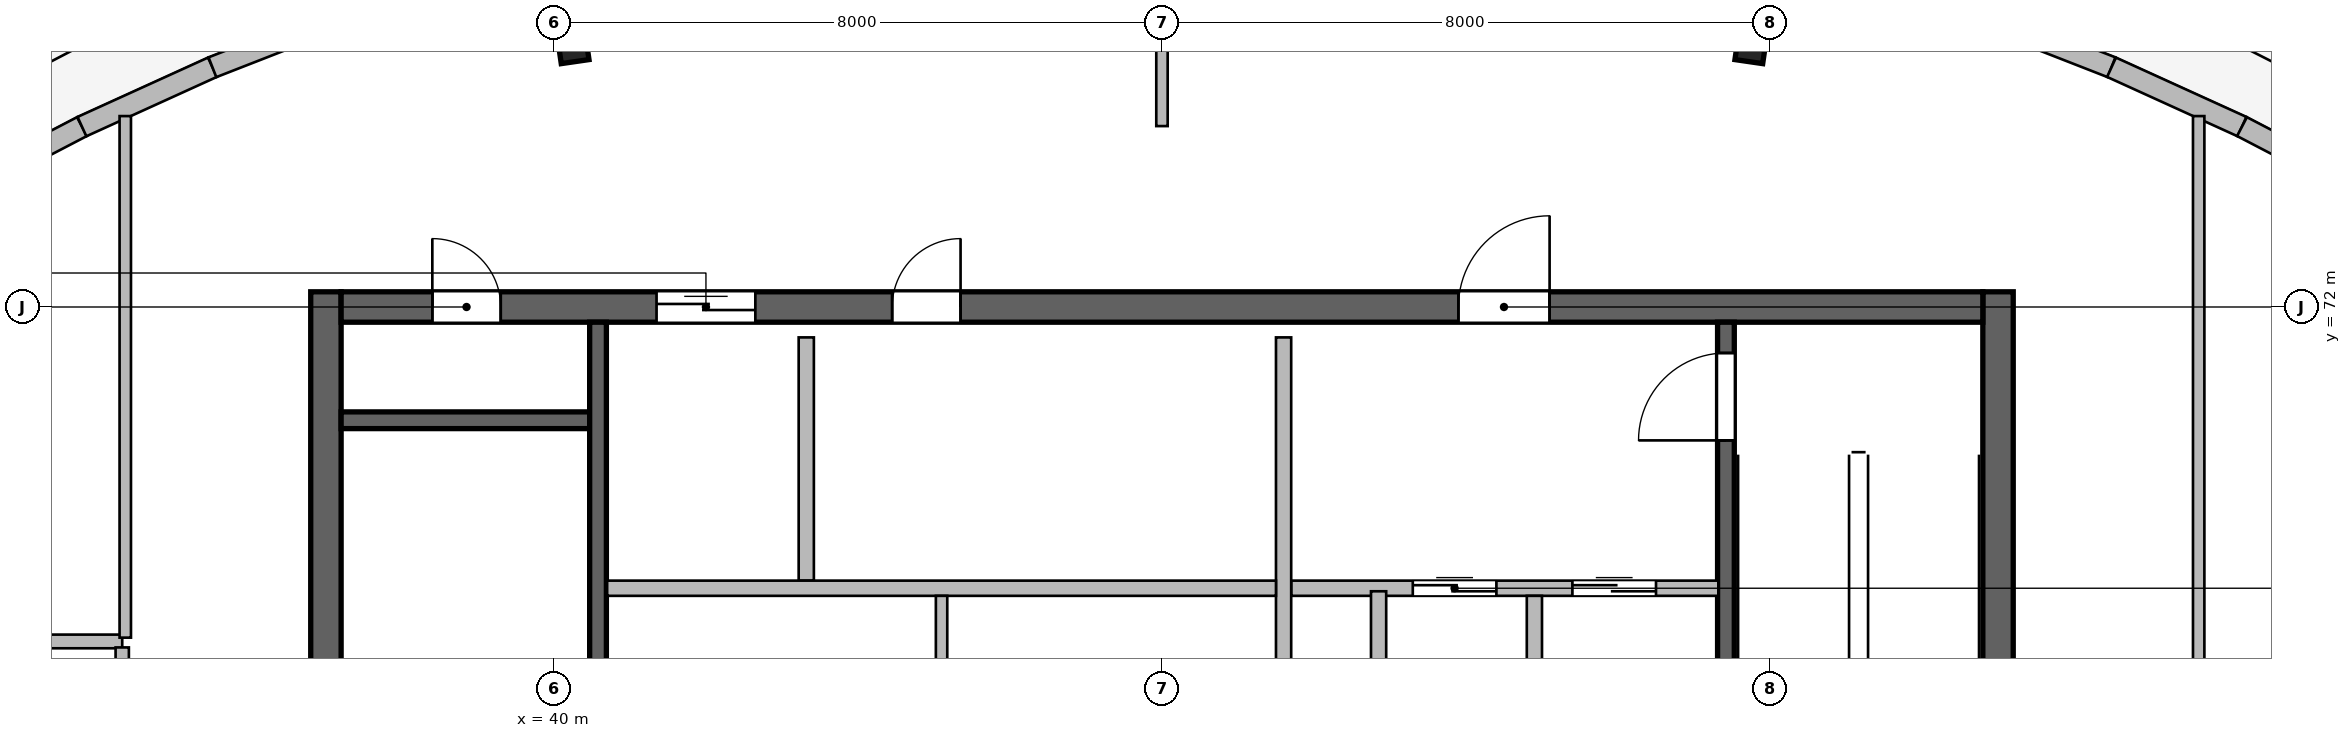
"""IFC4 building model, lengths in metres.
Left out: names, types, materials, properties, quantities, classifications, styles, units other than length and angle.
Written with IfcOpenShell. Run it as: python <this file> out.ifc"""

import sys

from ifc_helpers import new_model, si_unit, direction, frame, frame_2d, origin, origin_2d, place, context, subcontext, project, spatial, rectangle, i_section, extrude, source, transform, mapped, element, fill, save


model = new_model("IFC4")
c1 = context("Model", 3, precision=1e-05, world=origin(), true_north=direction((0.0, 1.0)))
c2 = subcontext(c1, "Body", "Model", "MODEL_VIEW")
j1 = project(units=[si_unit("LENGTHUNIT", "METRE"), si_unit("PLANEANGLEUNIT", "RADIAN")], contexts=[c1])
p1 = place(None, origin())
s1 = spatial("IfcSite", under=j1, at=p1, CompositionType="ELEMENT")
p2 = place(p1, origin())
s2 = spatial("IfcBuilding", under=s1, at=p2, CompositionType="ELEMENT")
p3 = place(p2, frame((0.0, 0.0, 312.6)))
s3 = spatial("IfcBuildingStorey", under=s2, at=p3, CompositionType="ELEMENT", Elevation=312.6)
m1 = source(origin(), c2, "Body", "SweptSolid", [
    extrude(rectangle(XDim=12.0, YDim=0.4, at=frame_2d((6.0, 0.0))), origin(), (0.0, 0.0, 1.0), 5.4),
])
for number, where, z_axis, x_axis in (
    (1, (37.0, 60.2, 0.0), (0.0, 0.0, 1.0), (0.0, 1.0, 0.0)),
    (2, (59.0, 60.2, 0.0), (0.0, 0.0, 1.0), (0.0, 1.0, 0.0)),
):
    element("IfcWall", number, at=place(p3, frame(where, z_axis=z_axis, x_axis=x_axis)), inside=s3, PredefinedType="SHEAR", context=c2, shape_type="MappedRepresentation", body=[
        mapped(m1, transform((0.0, 0.0, 0.0), scale=1.0)),
    ])
m2 = source(origin(), c2, "Body", "SweptSolid", [
    extrude(rectangle(XDim=21.6, YDim=0.4, at=frame_2d((10.8, 0.0))), origin(), (0.0, 0.0, 1.0), 5.4),
])
p4 = place(p3, frame((37.2, 72.0, 0.0), z_axis=(0.0, 0.0, 1.0), x_axis=(1.0, 0.0, 0.0)))
e3 = element("IfcWall", 3, at=p4, inside=s3, PredefinedType="SHEAR", context=c2, shape_type="MappedRepresentation", body=[
    mapped(m2, transform((0.0, 0.0, 0.0), scale=1.0)),
])
p5 = place(p4, frame((1.2, 0.0, 0.0)))
e4 = element("IfcOpeningElement", 4, at=p5, cuts=e3, PredefinedType="OPENING", context=c2, shape_type="SweptSolid", body=[
    extrude(rectangle(XDim=0.9, YDim=2.1, at=frame_2d((0.45, 1.05))), frame((0.0, 0.21, 0.0), z_axis=(0.0, -1.0, 0.0), x_axis=(1.0, 0.0, 0.0)), (0.0, 0.0, 1.0), 0.42),
])
p6 = place(p4, frame((14.7, 0.0, 0.0)))
e5 = element("IfcOpeningElement", 5, at=p6, cuts=e3, PredefinedType="OPENING", context=c2, shape_type="SweptSolid", body=[
    extrude(rectangle(XDim=1.2, YDim=2.15, at=frame_2d((0.6, 1.075))), frame((0.0, 0.21, 0.0), z_axis=(0.0, -1.0, 0.0), x_axis=(1.0, 0.0, 0.0)), (0.0, 0.0, 1.0), 0.42),
])
p7 = place(p4, frame((4.15, 0.0, 0.0)))
e6 = element("IfcOpeningElement", 6, at=p7, cuts=e3, PredefinedType="OPENING", context=c2, shape_type="SweptSolid", body=[
    extrude(rectangle(XDim=1.3, YDim=2.15, at=frame_2d((0.65, 1.075))), frame((0.0, 0.21, 0.0), z_axis=(0.0, -1.0, 0.0), x_axis=(1.0, 0.0, 0.0)), (0.0, 0.0, 1.0), 0.42),
])
p8 = place(p4, frame((7.25, 0.0, 0.0)))
e7 = element("IfcOpeningElement", 7, at=p8, cuts=e3, PredefinedType="OPENING", context=c2, shape_type="SweptSolid", body=[
    extrude(rectangle(XDim=0.9, YDim=2.1, at=frame_2d((0.45, 1.05))), frame((0.0, 0.21, 0.0), z_axis=(0.0, -1.0, 0.0), x_axis=(1.0, 0.0, 0.0)), (0.0, 0.0, 1.0), 0.42),
])
m3 = source(origin(), c2, "Body", "SweptSolid", [
    extrude(rectangle(XDim=3.27, YDim=0.22, at=frame_2d((1.635, 0.0))), origin(), (0.0, 0.0, 1.0), 5.4),
])
p9 = place(p3, frame((37.2, 70.51, 0.0), z_axis=(0.0, 0.0, 1.0), x_axis=(1.0, 0.0, 0.0)))
e8 = element("IfcWall", 8, at=p9, inside=s3, PredefinedType="SHEAR", context=c2, shape_type="MappedRepresentation", body=[
    mapped(m3, transform((0.0, 0.0, 0.0), scale=1.0)),
])
m4 = source(origin(), c2, "Body", "SweptSolid", [
    extrude(rectangle(XDim=11.2, YDim=0.22, at=frame_2d((5.6, 0.0))), origin(), (0.0, 0.0, 1.0), 5.4),
])
p10 = place(p3, frame((40.58, 60.6, 0.0), z_axis=(0.0, 0.0, 1.0), x_axis=(0.0, 1.0, 0.0)))
e9 = element("IfcWall", 9, at=p10, inside=s3, PredefinedType="SHEAR", context=c2, shape_type="MappedRepresentation", body=[
    mapped(m4, transform((0.0, 0.0, 0.0), scale=1.0)),
])
p11 = place(p3, frame((55.42, 60.6, 0.0), z_axis=(0.0, 0.0, 1.0), x_axis=(0.0, 1.0, 0.0)))
e10 = element("IfcWall", 10, at=p11, inside=s3, PredefinedType="SHEAR", context=c2, shape_type="MappedRepresentation", body=[
    mapped(m4, transform((0.0, 0.0, 0.0), scale=1.0)),
])
p12 = place(p11, frame((9.645, 0.0, 0.0)))
e11 = element("IfcOpeningElement", 11, at=p12, cuts=e10, PredefinedType="OPENING", context=c2, shape_type="SweptSolid", body=[
    extrude(rectangle(XDim=1.15, YDim=2.15, at=frame_2d((0.575, 1.075))), frame((0.0, 0.12, 0.0), z_axis=(0.0, -1.0, 0.0), x_axis=(1.0, 0.0, 0.0)), (0.0, 0.0, 1.0), 0.24),
])
m5 = source(origin(), c2, "Body", "SweptSolid", [
    extrude(i_section(OverallWidth=0.369, OverallDepth=0.356, WebThickness=0.011, FlangeThickness=0.018, at=origin_2d()), origin(), (0.0, 0.0, 1.0), 5.4),
])
for number, where, z_axis, x_axis in (
    (12, (40.253, 75.404, 0.0), (0.0, 0.0, 1.0), (-0.143, 0.99, 0.0)),
    (13, (55.747, 75.404, 0.0), (0.0, 0.0, 1.0), (0.143, 0.99, 0.0)),
):
    element("IfcColumn", number, at=place(p3, frame(where, z_axis=z_axis, x_axis=x_axis)), inside=s3, PredefinedType="COLUMN", context=c2, shape_type="MappedRepresentation", body=[
        mapped(m5, transform((0.0, 0.0, 0.0), scale=1.0)),
    ])
m6 = source(origin(), c2, "Body", "SweptSolid", [
    extrude(rectangle(XDim=1.906, YDim=0.28, at=frame_2d((0.953, 0.0))), origin(), (0.0, 0.0, 1.0), 5.12),
])
p13 = place(p3, frame((32.1, 73.493, 0.0), z_axis=(0.0, 0.0, 1.0), x_axis=(0.886820023543, 0.462114970373, 0.0)))
e14 = element("IfcWall", 14, at=p13, inside=s3, PredefinedType="SOLIDWALL", context=c2, shape_type="MappedRepresentation", body=[
    mapped(m6, transform((0.0, 0.0, 0.0), scale=1.0)),
])
m7 = source(origin(), c2, "Body", "SweptSolid", [
    extrude(rectangle(XDim=1.886, YDim=0.28, at=frame_2d((0.943, 0.0))), origin(), (0.0, 0.0, 1.0), 5.12),
])
p14 = place(p3, frame((33.79, 74.373, 0.0), z_axis=(0.0, 0.0, 1.0), x_axis=(0.910215678877, 0.414134540852, 0.0)))
e15 = element("IfcWall", 15, at=p14, inside=s3, PredefinedType="SOLIDWALL", context=c2, shape_type="MappedRepresentation", body=[
    mapped(m7, transform((0.0, 0.0, 0.0), scale=1.0)),
])
m8 = source(origin(), c2, "Body", "SweptSolid", [
    extrude(rectangle(XDim=1.869, YDim=0.28, at=frame_2d((0.934, 0.0))), origin(), (0.0, 0.0, 1.0), 5.12),
])
for number, where, z_axis, x_axis in (
    (16, (35.507, 75.154, 0.0), (0.0, 0.0, 1.0), (0.932, 0.364, 0.0)),
    (17, (58.753, 75.834, 0.0), (0.0, 0.0, 1.0), (0.932, -0.364, 0.0)),
):
    element("IfcWall", number, at=place(p3, frame(where, z_axis=z_axis, x_axis=x_axis)), inside=s3, PredefinedType="SOLIDWALL", context=c2, shape_type="MappedRepresentation", body=[
        mapped(m8, transform((0.0, 0.0, 0.0), scale=1.0)),
    ])
p15 = place(p3, frame((60.493, 75.154, 0.0), z_axis=(0.0, 0.0, 1.0), x_axis=(0.910215678877, -0.414134540852, 0.0)))
e18 = element("IfcWall", 18, at=p15, inside=s3, PredefinedType="SOLIDWALL", context=c2, shape_type="MappedRepresentation", body=[
    mapped(m7, transform((0.0, 0.0, 0.0), scale=1.0)),
])
p16 = place(p3, frame((62.21, 74.373, 0.0), z_axis=(0.0, 0.0, 1.0), x_axis=(0.886820023543, -0.462114970373, 0.0)))
e19 = element("IfcWall", 19, at=p16, inside=s3, PredefinedType="SOLIDWALL", context=c2, shape_type="MappedRepresentation", body=[
    mapped(m6, transform((0.0, 0.0, 0.0), scale=1.0)),
])
m9 = source(origin(), c2, "Body", "SweptSolid", [
    extrude(rectangle(XDim=5.62, YDim=0.2, at=frame_2d((2.81, 0.0))), origin(), (0.0, 0.0, 1.0), 5.12),
])
p17 = place(p3, frame((49.7, 68.3, 0.0), z_axis=(0.0, 0.0, 1.0), x_axis=(1.0, 0.0, 0.0)))
e20 = element("IfcWall", 20, at=p17, inside=s3, PredefinedType="SOLIDWALL", context=c2, shape_type="MappedRepresentation", body=[
    mapped(m9, transform((0.0, 0.0, 0.0), scale=1.0)),
])
p18 = place(p17, frame((1.6, 0.0, 0.0)))
e21 = element("IfcOpeningElement", 21, at=p18, cuts=e20, PredefinedType="OPENING", context=c2, shape_type="SweptSolid", body=[
    extrude(rectangle(XDim=1.1, YDim=2.15, at=frame_2d((0.55, 1.075))), frame((0.0, 0.11, 0.0), z_axis=(0.0, -1.0, 0.0), x_axis=(1.0, 0.0, 0.0)), (0.0, 0.0, 1.0), 0.22),
])
p19 = place(p17, frame((3.7, 0.0, 0.0)))
e22 = element("IfcOpeningElement", 22, at=p19, cuts=e20, PredefinedType="OPENING", context=c2, shape_type="SweptSolid", body=[
    extrude(rectangle(XDim=1.1, YDim=2.15, at=frame_2d((0.55, 1.075))), frame((0.0, 0.11, 0.0), z_axis=(0.0, -1.0, 0.0), x_axis=(1.0, 0.0, 0.0)), (0.0, 0.0, 1.0), 0.22),
])
m10 = source(origin(), c2, "Body", "SweptSolid", [
    extrude(rectangle(XDim=5.8, YDim=0.2, at=frame_2d((2.9, 0.0))), origin(), (0.0, 0.0, 1.0), 5.12),
])
p20 = place(p3, frame((49.6, 65.8, 0.0), z_axis=(0.0, 0.0, 1.0), x_axis=(0.0, 1.0, 0.0)))
e23 = element("IfcWall", 23, at=p20, inside=s3, PredefinedType="SOLIDWALL", context=c2, shape_type="MappedRepresentation", body=[
    mapped(m10, transform((0.0, 0.0, 0.0), scale=1.0)),
])
m11 = source(origin(), c2, "Body", "SweptSolid", [
    extrude(rectangle(XDim=2.58, YDim=0.2, at=frame_2d((1.29, 0.0))), origin(), (0.0, 0.0, 1.0), 5.12),
])
p21 = place(p3, frame((50.85, 65.68, 0.0), z_axis=(0.0, 0.0, 1.0), x_axis=(0.0, 1.0, 0.0)))
e24 = element("IfcWall", 24, at=p21, inside=s3, PredefinedType="SOLIDWALL", context=c2, shape_type="MappedRepresentation", body=[
    mapped(m11, transform((0.0, 0.0, 0.0), scale=1.0)),
])
m12 = source(origin(), c2, "Body", "SweptSolid", [
    extrude(rectangle(XDim=2.4, YDim=0.2, at=frame_2d((1.2, 0.0))), origin(), (0.0, 0.0, 1.0), 5.12),
])
p22 = place(p3, frame((52.9, 65.8, 0.0), z_axis=(0.0, 0.0, 1.0), x_axis=(0.0, 1.0, 0.0)))
e25 = element("IfcWall", 25, at=p22, inside=s3, PredefinedType="SOLIDWALL", context=c2, shape_type="MappedRepresentation", body=[
    mapped(m12, transform((0.0, 0.0, 0.0), scale=1.0)),
])
m13 = source(origin(), c2, "Body", "SweptSolid", [
    extrude(rectangle(XDim=3.2, YDim=0.2, at=frame_2d((1.6, 0.0))), origin(), (0.0, 0.0, 1.0), 5.12),
])
p23 = place(p3, frame((43.32, 68.4, 0.0), z_axis=(0.0, 0.0, 1.0), x_axis=(0.0, 1.0, 0.0)))
e26 = element("IfcWall", 26, at=p23, inside=s3, PredefinedType="SOLIDWALL", context=c2, shape_type="MappedRepresentation", body=[
    mapped(m13, transform((0.0, 0.0, 0.0), scale=1.0)),
])
m14 = source(origin(), c2, "Body", "SweptSolid", [
    extrude(rectangle(XDim=8.8, YDim=0.2, at=frame_2d((4.4, 0.0))), origin(), (0.0, 0.0, 1.0), 5.12),
])
p24 = place(p3, frame((40.7, 68.3, 0.0), z_axis=(0.0, 0.0, 1.0), x_axis=(1.0, 0.0, 0.0)))
e27 = element("IfcWall", 27, at=p24, inside=s3, PredefinedType="SOLIDWALL", context=c2, shape_type="MappedRepresentation", body=[
    mapped(m14, transform((0.0, 0.0, 0.0), scale=1.0)),
])
m15 = source(origin(), c2, "Body", "SweptSolid", [
    extrude(rectangle(XDim=2.4, YDim=0.15, at=frame_2d((1.2, 0.0))), origin(), (0.0, 0.0, 1.0), 5.12),
])
p25 = place(p3, frame((45.1, 65.8, 0.0), z_axis=(0.0, 0.0, 1.0), x_axis=(0.0, 1.0, 0.0)))
e28 = element("IfcWall", 28, at=p25, inside=s3, PredefinedType="PARTITIONING", context=c2, shape_type="MappedRepresentation", body=[
    mapped(m15, transform((0.0, 0.0, 0.0), scale=1.0)),
])
m16 = source(origin(), c2, "Body", "SweptSolid", [
    extrude(rectangle(XDim=3.52, YDim=0.18, at=frame_2d((1.76, 0.0))), origin(), (0.0, 0.0, 1.0), 5.12),
])
p26 = place(p3, frame((30.8, 67.6, 0.0), z_axis=(0.0, 0.0, 1.0), x_axis=(1.0, 0.0, 0.0)))
e29 = element("IfcWall", 29, at=p26, inside=s3, PredefinedType="PLUMBINGWALL", context=c2, shape_type="MappedRepresentation", body=[
    mapped(m16, transform((0.0, 0.0, 0.0), scale=1.0)),
])
m17 = source(origin(), c2, "Body", "SweptSolid", [
    extrude(rectangle(XDim=2.002, YDim=0.175, at=frame_2d((1.001, 0.0))), origin(), (0.0, 0.0, 1.0), 5.12),
])
p27 = place(p3, frame((34.32, 65.519, 0.0), z_axis=(0.0, 0.0, 1.0), x_axis=(0.0, 1.0, 0.0)))
e30 = element("IfcWall", 30, at=p27, inside=s3, PredefinedType="PARTITIONING", context=c2, shape_type="MappedRepresentation", body=[
    mapped(m17, transform((0.0, 0.0, 0.0), scale=1.0)),
])
p28 = place(p27, frame((0.526, 0.0, 0.0)))
e31 = element("IfcOpeningElement", 31, at=p28, cuts=e30, PredefinedType="OPENING", context=c2, shape_type="SweptSolid", body=[
    extrude(rectangle(XDim=0.95, YDim=2.12, at=frame_2d((0.475, 1.06))), frame((0.0, 0.098, 0.0), z_axis=(0.0, -1.0, 0.0), x_axis=(1.0, 0.0, 0.0)), (0.0, 0.0, 1.0), 0.195),
])
m18 = source(origin(), c2, "Body", "SweptSolid", [
    extrude(rectangle(XDim=3.241, YDim=0.15, at=frame_2d((1.621, 0.0))), origin(), (0.0, 0.0, 1.0), 4.794),
])
p29 = place(p3, frame((48.0, 74.38, 0.0), z_axis=(0.0, 0.0, 1.0), x_axis=(0.0, 1.0, 0.0)))
e32 = element("IfcWall", 32, at=p29, inside=s3, PredefinedType="PARTITIONING", context=c2, shape_type="MappedRepresentation", body=[
    mapped(m18, transform((0.0, 0.0, 0.0), scale=1.0)),
])
m19 = source(origin(), c2, "Body", "SweptSolid", [
    extrude(rectangle(XDim=6.862, YDim=0.15, at=frame_2d((3.431, 0.0))), origin(), (0.0, 0.0, 1.0), 5.12),
])
p30 = place(p3, frame((34.36, 67.65, 0.0), z_axis=(0.0, 0.0, 1.0), x_axis=(0.0, 1.0, 0.0)))
e33 = element("IfcWall", 33, at=p30, inside=s3, PredefinedType="PARTITIONING", context=c2, shape_type="MappedRepresentation", body=[
    mapped(m19, transform((0.0, 0.0, 0.0), scale=1.0)),
])
m20 = source(origin(), c2, "Body", "SweptSolid", [
    extrude(rectangle(XDim=8.962, YDim=0.15, at=frame_2d((4.481, 0.0))), origin(), (0.0, 0.0, 1.0), 5.12),
])
p31 = place(p3, frame((61.64, 65.55, 0.0), z_axis=(0.0, 0.0, 1.0), x_axis=(0.0, 1.0, 0.0)))
e34 = element("IfcWall", 34, at=p31, inside=s3, PredefinedType="PARTITIONING", context=c2, shape_type="MappedRepresentation", body=[
    mapped(m20, transform((0.0, 0.0, 0.0), scale=1.0)),
])
m21 = source(origin(), c2, "Body", "SweptSolid", [
    extrude(rectangle(XDim=0.9, YDim=2.1, at=frame_2d((0.45, 1.05))), frame((0.0, 0.025, 0.0), z_axis=(0.0, -1.0, 0.0), x_axis=(1.0, 0.0, 0.0)), (0.0, 0.0, 1.0), 0.05),
])
p32 = place(p5, origin())
e35 = element("IfcDoor", 35, at=p32, inside=s3, OperationType="SINGLE_SWING_LEFT", PredefinedType="DOOR", context=c2, shape_type="MappedRepresentation", body=[
    mapped(m21, transform((0.0, 0.0, 0.0), scale=1.0)),
])
fill(e4, e35)
m22 = source(origin(), c2, "Body", "SweptSolid", [
    extrude(rectangle(XDim=1.15, YDim=2.15, at=frame_2d((0.575, 1.075))), frame((0.0, 0.025, 0.0), z_axis=(0.0, -1.0, 0.0), x_axis=(1.0, 0.0, 0.0)), (0.0, 0.0, 1.0), 0.05),
])
p33 = place(p12, origin())
e36 = element("IfcDoor", 36, at=p33, inside=s3, OperationType="SINGLE_SWING_LEFT", PredefinedType="DOOR", context=c2, shape_type="MappedRepresentation", body=[
    mapped(m22, transform((0.0, 0.0, 0.0), scale=1.0)),
])
fill(e11, e36)
m23 = source(origin(), c2, "Body", "SweptSolid", [
    extrude(rectangle(XDim=1.2, YDim=2.15, at=frame_2d((0.6, 1.075))), frame((0.0, 0.025, 0.0), z_axis=(0.0, -1.0, 0.0), x_axis=(1.0, 0.0, 0.0)), (0.0, 0.0, 1.0), 0.05),
])
p34 = place(p6, origin())
e37 = element("IfcDoor", 37, at=p34, inside=s3, OperationType="SINGLE_SWING_RIGHT", PredefinedType="DOOR", context=c2, shape_type="MappedRepresentation", body=[
    mapped(m23, transform((0.0, 0.0, 0.0), scale=1.0)),
])
fill(e5, e37)
m24 = source(origin(), c2, "Body", "SweptSolid", [
    extrude(rectangle(XDim=1.1, YDim=2.15, at=frame_2d((0.55, 1.075))), frame((0.0, 0.025, 0.0), z_axis=(0.0, -1.0, 0.0), x_axis=(1.0, 0.0, 0.0)), (0.0, 0.0, 1.0), 0.05),
])
p35 = place(p18, origin())
e38 = element("IfcDoor", 38, at=p35, inside=s3, OperationType="DOUBLE_DOOR_SLIDING", PredefinedType="DOOR", context=c2, shape_type="MappedRepresentation", body=[
    mapped(m24, transform((0.0, 0.0, 0.0), scale=1.0)),
])
fill(e21, e38)
p36 = place(p19, origin())
e39 = element("IfcDoor", 39, at=p36, inside=s3, OperationType="DOUBLE_DOOR_SLIDING", PredefinedType="DOOR", context=c2, shape_type="MappedRepresentation", body=[
    mapped(m24, transform((0.0, 0.0, 0.0), scale=1.0)),
])
fill(e22, e39)
m25 = source(origin(), c2, "Body", "SweptSolid", [
    extrude(rectangle(XDim=1.3, YDim=2.15, at=frame_2d((0.65, 1.075))), frame((0.0, 0.025, 0.0), z_axis=(0.0, -1.0, 0.0), x_axis=(1.0, 0.0, 0.0)), (0.0, 0.0, 1.0), 0.05),
])
p37 = place(p7, origin())
e40 = element("IfcDoor", 40, at=p37, inside=s3, OperationType="DOUBLE_DOOR_SLIDING", PredefinedType="DOOR", context=c2, shape_type="MappedRepresentation", body=[
    mapped(m25, transform((0.0, 0.0, 0.0), scale=1.0)),
])
fill(e6, e40)
p38 = place(p8, origin())
e41 = element("IfcDoor", 41, at=p38, inside=s3, OperationType="SINGLE_SWING_RIGHT", PredefinedType="DOOR", context=c2, shape_type="MappedRepresentation", body=[
    mapped(m21, transform((0.0, 0.0, 0.0), scale=1.0)),
])
fill(e7, e41)
save(model, sys.argv[1])
